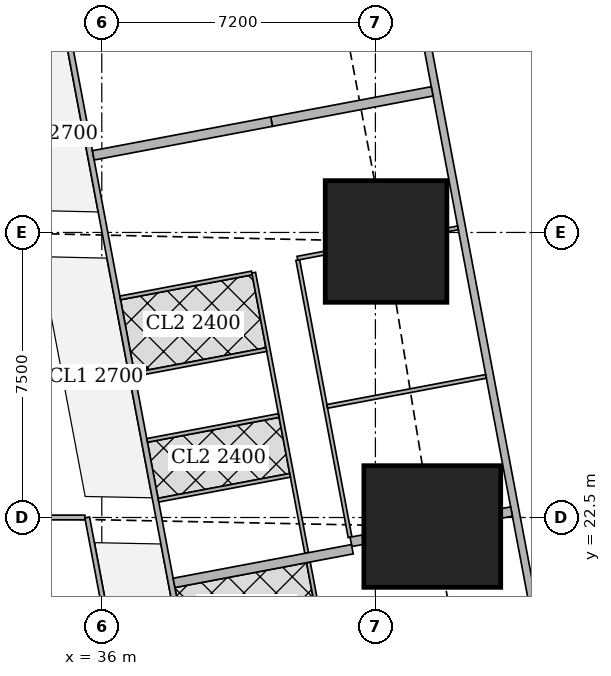
"""IFC4 building model, lengths in metres.
Left out: names, types, materials, properties, quantities, classifications, styles, units other than length and angle.
Written with IfcOpenShell. Run it as: python <this file> out.ifc"""

import sys

from ifc_helpers import new_model, si_unit, direction, frame, frame_2d, origin, origin_2d, place, context, subcontext, project, spatial, rectangle, extrude, element, fill, save


model = new_model("IFC4")
c1 = context("Model", 3, precision=1e-05, world=origin(), true_north=direction((0.0, 1.0)))
c2 = subcontext(c1, "Body", "Model", "MODEL_VIEW")
j1 = project(units=[si_unit("LENGTHUNIT", "METRE"), si_unit("PLANEANGLEUNIT", "RADIAN")], contexts=[c1])
p1 = place(None, origin())
s1 = spatial("IfcSite", under=j1, at=p1, CompositionType="ELEMENT")
p2 = place(p1, origin())
s2 = spatial("IfcBuilding", under=s1, at=p2, CompositionType="ELEMENT")
p3 = place(p2, frame((0.0, 0.0, 20.0)))
s3 = spatial("IfcBuildingStorey", under=s2, at=p3, CompositionType="ELEMENT", Elevation=20.0)
p4 = place(p3, frame((44.697, 22.263, 0.0), z_axis=(0.0, 0.0, 1.0), x_axis=(1.0, 0.0, 0.0)))
e1 = element("IfcColumn", 1, at=p4, inside=s3, PredefinedType="COLUMN", context=c2, shape_type="SweptSolid", body=[
    extrude(rectangle(XDim=3.6, YDim=3.2, at=origin_2d()), origin(), (0.0, 0.0, 1.0), 3.75),
])
p5 = place(p3, frame((43.48, 29.763, 0.0), z_axis=(0.0, 0.0, 1.0), x_axis=(1.0, 0.0, 0.0)))
e2 = element("IfcColumn", 2, at=p5, inside=s3, PredefinedType="COLUMN", context=c2, shape_type="SweptSolid", body=[
    extrude(rectangle(XDim=3.2, YDim=3.2, at=origin_2d()), origin(), (0.0, 0.0, 1.0), 3.75),
])
p6 = place(p3, frame((50.653, 2.703, 0.0), z_axis=(0.0, 0.0, 1.0), x_axis=(-0.185612026696, 0.982623109613, 0.0)))
e3 = element("IfcWall", 3, at=p6, inside=s3, PredefinedType="SOLIDWALL", context=c2, shape_type="SweptSolid", body=[
    extrude(rectangle(XDim=41.393, YDim=0.2, at=frame_2d((20.697, 0.0))), origin(), (0.0, 0.0, 1.0), 3.5),
])
p7 = place(p6, frame((1.633, 0.0, 0.9)))
e4 = element("IfcOpeningElement", 4, at=p7, cuts=e3, PredefinedType="OPENING", context=c2, shape_type="SweptSolid", body=[
    extrude(rectangle(XDim=1.8, YDim=1.5, at=frame_2d((0.9, 0.75))), frame((0.0, 0.11, 0.0), z_axis=(0.0, -1.0, 0.0), x_axis=(1.0, 0.0, 0.0)), (0.0, 0.0, 1.0), 0.22),
])
p8 = place(p6, frame((6.032, 0.0, 0.9)))
e5 = element("IfcOpeningElement", 5, at=p8, cuts=e3, PredefinedType="OPENING", context=c2, shape_type="SweptSolid", body=[
    extrude(rectangle(XDim=1.8, YDim=1.5, at=frame_2d((0.9, 0.75))), frame((0.0, 0.11, 0.0), z_axis=(0.0, -1.0, 0.0), x_axis=(1.0, 0.0, 0.0)), (0.0, 0.0, 1.0), 0.22),
])
p9 = place(p6, frame((9.848, 0.0, 0.9)))
e6 = element("IfcOpeningElement", 6, at=p9, cuts=e3, PredefinedType="OPENING", context=c2, shape_type="SweptSolid", body=[
    extrude(rectangle(XDim=1.8, YDim=1.5, at=frame_2d((0.9, 0.75))), frame((0.0, 0.11, 0.0), z_axis=(0.0, -1.0, 0.0), x_axis=(1.0, 0.0, 0.0)), (0.0, 0.0, 1.0), 0.22),
])
p10 = place(p6, frame((17.481, 0.0, 0.9)))
e7 = element("IfcOpeningElement", 7, at=p10, cuts=e3, PredefinedType="OPENING", context=c2, shape_type="SweptSolid", body=[
    extrude(rectangle(XDim=1.8, YDim=1.5, at=frame_2d((0.9, 0.75))), frame((0.0, 0.11, 0.0), z_axis=(0.0, -1.0, 0.0), x_axis=(1.0, 0.0, 0.0)), (0.0, 0.0, 1.0), 0.22),
])
p11 = place(p6, frame((21.297, 0.0, 0.9)))
e8 = element("IfcOpeningElement", 8, at=p11, cuts=e3, PredefinedType="OPENING", context=c2, shape_type="SweptSolid", body=[
    extrude(rectangle(XDim=1.8, YDim=1.5, at=frame_2d((0.9, 0.75))), frame((0.0, 0.11, 0.0), z_axis=(0.0, -1.0, 0.0), x_axis=(1.0, 0.0, 0.0)), (0.0, 0.0, 1.0), 0.22),
])
p12 = place(p6, frame((25.113, 0.0, 0.9)))
e9 = element("IfcOpeningElement", 9, at=p12, cuts=e3, PredefinedType="OPENING", context=c2, shape_type="SweptSolid", body=[
    extrude(rectangle(XDim=1.8, YDim=1.5, at=frame_2d((0.9, 0.75))), frame((0.0, 0.11, 0.0), z_axis=(0.0, -1.0, 0.0), x_axis=(1.0, 0.0, 0.0)), (0.0, 0.0, 1.0), 0.22),
])
p13 = place(p6, frame((28.93, 0.0, 0.9)))
e10 = element("IfcOpeningElement", 10, at=p13, cuts=e3, PredefinedType="OPENING", context=c2, shape_type="SweptSolid", body=[
    extrude(rectangle(XDim=1.8, YDim=1.5, at=frame_2d((0.9, 0.75))), frame((0.0, 0.11, 0.0), z_axis=(0.0, -1.0, 0.0), x_axis=(1.0, 0.0, 0.0)), (0.0, 0.0, 1.0), 0.22),
])
p14 = place(p6, frame((32.746, 0.0, 0.9)))
e11 = element("IfcOpeningElement", 11, at=p14, cuts=e3, PredefinedType="OPENING", context=c2, shape_type="SweptSolid", body=[
    extrude(rectangle(XDim=1.8, YDim=1.5, at=frame_2d((0.9, 0.75))), frame((0.0, 0.11, 0.0), z_axis=(0.0, -1.0, 0.0), x_axis=(1.0, 0.0, 0.0)), (0.0, 0.0, 1.0), 0.22),
])
p15 = place(p6, frame((36.481, 0.0, 0.9)))
e12 = element("IfcOpeningElement", 12, at=p15, cuts=e3, PredefinedType="OPENING", context=c2, shape_type="SweptSolid", body=[
    extrude(rectangle(XDim=1.8, YDim=1.5, at=frame_2d((0.9, 0.75))), frame((0.0, 0.11, 0.0), z_axis=(0.0, -1.0, 0.0), x_axis=(1.0, 0.0, 0.0)), (0.0, 0.0, 1.0), 0.22),
])
p16 = place(p3, frame((33.755, 42.325, 0.0), z_axis=(0.0, 0.0, 1.0), x_axis=(0.185611461091, -0.982623216453, 0.0)))
e13 = element("IfcWall", 13, at=p16, inside=s3, PredefinedType="SOLIDWALL", context=c2, shape_type="SweptSolid", body=[
    extrude(rectangle(XDim=40.241, YDim=0.15, at=frame_2d((20.121, 0.0))), origin(), (0.0, 0.0, 1.0), 2.5),
])
p17 = place(p16, frame((7.325, 0.0, 0.0)))
e14 = element("IfcOpeningElement", 14, at=p17, cuts=e13, PredefinedType="OPENING", context=c2, shape_type="SweptSolid", body=[
    extrude(rectangle(XDim=1.0, YDim=2.1, at=frame_2d((0.5, 1.05))), frame((0.0, 0.085, 0.0), z_axis=(0.0, -1.0, 0.0), x_axis=(1.0, 0.0, 0.0)), (0.0, 0.0, 1.0), 0.17),
])
p18 = place(p16, frame((11.902, 0.0, 0.0)))
e15 = element("IfcOpeningElement", 15, at=p18, cuts=e13, PredefinedType="OPENING", context=c2, shape_type="SweptSolid", body=[
    extrude(rectangle(XDim=1.0, YDim=2.1, at=frame_2d((0.5, 1.05))), frame((0.0, 0.085, 0.0), z_axis=(0.0, -1.0, 0.0), x_axis=(1.0, 0.0, 0.0)), (0.0, 0.0, 1.0), 0.17),
])
p19 = place(p16, frame((25.718, 0.0, 0.0)))
e16 = element("IfcOpeningElement", 16, at=p19, cuts=e13, PredefinedType="OPENING", context=c2, shape_type="SweptSolid", body=[
    extrude(rectangle(XDim=1.0, YDim=2.1, at=frame_2d((0.5, 1.05))), frame((0.0, 0.085, 0.0), z_axis=(0.0, -1.0, 0.0), x_axis=(1.0, 0.0, 0.0)), (0.0, 0.0, 1.0), 0.17),
])
p20 = place(p16, frame((31.788, 0.0, 0.0)))
e17 = element("IfcOpeningElement", 17, at=p20, cuts=e13, PredefinedType="OPENING", context=c2, shape_type="SweptSolid", body=[
    extrude(rectangle(XDim=1.0, YDim=2.1, at=frame_2d((0.5, 1.05))), frame((0.0, 0.085, 0.0), z_axis=(0.0, -1.0, 0.0), x_axis=(1.0, 0.0, 0.0)), (0.0, 0.0, 1.0), 0.17),
])
p21 = place(p3, frame((41.157, 29.273, 0.0), z_axis=(0.0, 0.0, 1.0), x_axis=(0.18542464283, -0.982658486877, 0.0)))
e18 = element("IfcWall", 18, at=p21, inside=s3, PredefinedType="PARTITIONING", context=c2, shape_type="SweptSolid", body=[
    extrude(rectangle(XDim=7.421, YDim=0.1, at=frame_2d((3.71, 0.0))), origin(), (0.0, 0.0, 1.0), 2.5),
])
p22 = place(p21, frame((1.4, 0.0, 0.0)))
e19 = element("IfcOpeningElement", 19, at=p22, cuts=e18, PredefinedType="OPENING", context=c2, shape_type="SweptSolid", body=[
    extrude(rectangle(XDim=0.9, YDim=2.1, at=frame_2d((0.45, 1.05))), frame((0.0, 0.06, 0.0), z_axis=(0.0, -1.0, 0.0), x_axis=(1.0, 0.0, 0.0)), (0.0, 0.0, 1.0), 0.12),
])
p23 = place(p21, frame((4.126, 0.0, 0.0)))
e20 = element("IfcOpeningElement", 20, at=p23, cuts=e18, PredefinedType="OPENING", context=c2, shape_type="SweptSolid", body=[
    extrude(rectangle(XDim=0.9, YDim=2.1, at=frame_2d((0.45, 1.05))), frame((0.0, 0.06, 0.0), z_axis=(0.0, -1.0, 0.0), x_axis=(1.0, 0.0, 0.0)), (0.0, 0.0, 1.0), 0.12),
])
p24 = place(p3, frame((39.997, 28.942, 0.0), z_axis=(0.0, 0.0, 1.0), x_axis=(0.185686318797, -0.982609073341, 0.0)))
e21 = element("IfcWall", 21, at=p24, inside=s3, PredefinedType="PARTITIONING", context=c2, shape_type="SweptSolid", body=[
    extrude(rectangle(XDim=7.508, YDim=0.1, at=frame_2d((3.754, 0.0))), origin(), (0.0, 0.0, 1.0), 2.5),
])
p25 = place(p24, frame((0.576, 0.0, 0.0)))
e22 = element("IfcOpeningElement", 22, at=p25, cuts=e21, PredefinedType="OPENING", context=c2, shape_type="SweptSolid", body=[
    extrude(rectangle(XDim=0.9, YDim=2.1, at=frame_2d((0.45, 1.05))), frame((0.0, 0.06, 0.0), z_axis=(0.0, -1.0, 0.0), x_axis=(1.0, 0.0, 0.0)), (0.0, 0.0, 1.0), 0.12),
])
p26 = place(p24, frame((4.166, 0.0, 0.0)))
e23 = element("IfcOpeningElement", 23, at=p26, cuts=e21, PredefinedType="OPENING", context=c2, shape_type="SweptSolid", body=[
    extrude(rectangle(XDim=0.9, YDim=2.1, at=frame_2d((0.45, 1.05))), frame((0.0, 0.06, 0.0), z_axis=(0.0, -1.0, 0.0), x_axis=(1.0, 0.0, 0.0)), (0.0, 0.0, 1.0), 0.12),
])
p27 = place(p24, frame((2.483, 0.0, 0.0)))
e24 = element("IfcOpeningElement", 24, at=p27, cuts=e21, PredefinedType="OPENING", context=c2, shape_type="SweptSolid", body=[
    extrude(rectangle(XDim=0.9, YDim=2.1, at=frame_2d((0.45, 1.05))), frame((0.0, 0.06, 0.0), z_axis=(0.0, -1.0, 0.0), x_axis=(1.0, 0.0, 0.0)), (0.0, 0.0, 1.0), 0.12),
])
p28 = place(p24, frame((6.074, 0.0, 0.0)))
e25 = element("IfcOpeningElement", 25, at=p28, cuts=e21, PredefinedType="OPENING", context=c2, shape_type="SweptSolid", body=[
    extrude(rectangle(XDim=0.9, YDim=2.1, at=frame_2d((0.45, 1.05))), frame((0.0, 0.06, 0.0), z_axis=(0.0, -1.0, 0.0), x_axis=(1.0, 0.0, 0.0)), (0.0, 0.0, 1.0), 0.12),
])
p29 = place(p3, frame((45.372, 30.121, 0.0), z_axis=(0.0, 0.0, 1.0), x_axis=(-0.982024635814, -0.188752787143, 0.0)))
e26 = element("IfcWall", 26, at=p29, inside=s3, PredefinedType="PARTITIONING", context=c2, shape_type="SweptSolid", body=[
    extrude(rectangle(XDim=0.287, YDim=0.1, at=frame_2d((0.144, 0.0))), origin(), (0.0, 0.0, 1.0), 3.5),
])
p30 = place(p3, frame((41.87, 29.459, 0.0), z_axis=(0.0, 0.0, 1.0), x_axis=(-0.982532562822, -0.186090738603, 0.0)))
e27 = element("IfcWall", 27, at=p30, inside=s3, PredefinedType="PARTITIONING", context=c2, shape_type="SweptSolid", body=[
    extrude(rectangle(XDim=0.736, YDim=0.1, at=frame_2d((0.368, 0.0))), origin(), (0.0, 0.0, 1.0), 2.5),
])
p31 = place(p3, frame((46.11, 26.213, 0.0), z_axis=(0.0, 0.0, 1.0), x_axis=(-0.982623519589, -0.185609856287, 0.0)))
e28 = element("IfcWall", 28, at=p31, inside=s3, PredefinedType="PARTITIONING", context=c2, shape_type="SweptSolid", body=[
    extrude(rectangle(XDim=4.25, YDim=0.1, at=frame_2d((2.125, 0.0))), origin(), (0.0, 0.0, 1.0), 2.05),
])
for number, where, z_axis, x_axis in (
    (29, (39.948, 28.933, 0.0), (0.0, 0.0, 1.0), (-0.983, -0.186, 0.0)),
    (30, (40.656, 25.183, 0.0), (0.0, 0.0, 1.0), (-0.983, -0.186, 0.0)),
):
    element("IfcWall", number, at=place(p3, frame(where, z_axis=z_axis, x_axis=x_axis)), inside=s3, PredefinedType="PARTITIONING", context=c2, shape_type="SweptSolid", body=[
        extrude(rectangle(XDim=3.524, YDim=0.1, at=frame_2d((1.762, 0.0))), origin(), (0.0, 0.0, 1.0), 3.5),
    ])
p32 = place(p3, frame((40.329, 26.918, 0.0), z_axis=(0.0, 0.0, 1.0), x_axis=(-0.982638553676, -0.185530247748, 0.0)))
e31 = element("IfcWall", 31, at=p32, inside=s3, PredefinedType="PARTITIONING", context=c2, shape_type="SweptSolid", body=[
    extrude(rectangle(XDim=3.525, YDim=0.1, at=frame_2d((1.763, 0.0))), origin(), (0.0, 0.0, 1.0), 3.5),
])
p33 = place(p3, frame((40.954, 23.61, 0.0), z_axis=(0.0, 0.0, 1.0), x_axis=(-0.982638553676, -0.185530247748, 0.0)))
e32 = element("IfcWall", 32, at=p33, inside=s3, PredefinedType="PARTITIONING", context=c2, shape_type="SweptSolid", body=[
    extrude(rectangle(XDim=3.525, YDim=0.1, at=frame_2d((1.763, 0.0))), origin(), (0.0, 0.0, 1.0), 2.5),
])
p34 = place(p3, frame((44.693, 33.713, 0.0), z_axis=(0.0, 0.0, 1.0), x_axis=(-0.982633535512, -0.185556823879, 0.0)))
e33 = element("IfcWall", 33, at=p34, inside=s3, PredefinedType="SOLIDWALL", context=c2, shape_type="SweptSolid", body=[
    extrude(rectangle(XDim=4.3, YDim=0.25, at=frame_2d((2.15, 0.0))), origin(), (0.0, 0.0, 1.0), 2.05),
])
p35 = place(p3, frame((40.468, 32.915, 0.0), z_axis=(0.0, 0.0, 1.0), x_axis=(-0.982635807605, -0.185544791394, 0.0)))
e34 = element("IfcWall", 34, at=p35, inside=s3, PredefinedType="SOLIDWALL", context=c2, shape_type="SweptSolid", body=[
    extrude(rectangle(XDim=4.775, YDim=0.25, at=frame_2d((2.388, 0.0))), origin(), (0.0, 0.0, 1.0), 3.5),
])
p36 = place(p3, frame((41.437, 21.319, 0.0), z_axis=(0.0, 0.0, 1.0), x_axis=(0.185783379659, -0.98259072652, 0.0)))
e35 = element("IfcWall", 35, at=p36, inside=s3, PredefinedType="PARTITIONING", context=c2, shape_type="SweptSolid", body=[
    extrude(rectangle(XDim=1.765, YDim=0.1, at=frame_2d((0.882, 0.0))), origin(), (0.0, 0.0, 1.0), 3.5),
])
p37 = place(p36, frame((0.374, 0.0, 0.0)))
e36 = element("IfcOpeningElement", 36, at=p37, cuts=e35, PredefinedType="OPENING", context=c2, shape_type="SweptSolid", body=[
    extrude(rectangle(XDim=0.9, YDim=2.1, at=frame_2d((0.45, 1.05))), frame((0.0, 0.06, 0.0), z_axis=(0.0, -1.0, 0.0), x_axis=(1.0, 0.0, 0.0)), (0.0, 0.0, 1.0), 0.12),
])
p38 = place(p3, frame((46.782, 22.657, 0.0), z_axis=(0.0, 0.0, 1.0), x_axis=(-0.982104607121, -0.188336243648, 0.0)))
e37 = element("IfcWall", 37, at=p38, inside=s3, PredefinedType="SOLIDWALL", context=c2, shape_type="SweptSolid", body=[
    extrude(rectangle(XDim=0.266, YDim=0.25, at=frame_2d((0.133, 0.0))), origin(), (0.0, 0.0, 1.0), 3.5),
])
p39 = place(p3, frame((42.873, 21.918, 0.0), z_axis=(0.0, 0.0, 1.0), x_axis=(-0.982431406936, -0.186624035603, 0.0)))
e38 = element("IfcWall", 38, at=p39, inside=s3, PredefinedType="SOLIDWALL", context=c2, shape_type="SweptSolid", body=[
    extrude(rectangle(XDim=0.322, YDim=0.25, at=frame_2d((0.161, 0.0))), origin(), (0.0, 0.0, 1.0), 2.5),
])
p40 = place(p3, frame((42.593, 21.665, 0.0), z_axis=(0.0, 0.0, 1.0), x_axis=(-0.982635807605, -0.185544791394, 0.0)))
e39 = element("IfcWall", 39, at=p40, inside=s3, PredefinedType="SOLIDWALL", context=c2, shape_type="SweptSolid", body=[
    extrude(rectangle(XDim=4.775, YDim=0.25, at=frame_2d((2.388, 0.0))), origin(), (0.0, 0.0, 1.0), 2.5),
])
p41 = place(p3, frame((36.861, 15.913, 0.0), z_axis=(0.0, 0.0, 1.0), x_axis=(-0.185598960122, 0.982625577726, 0.0)))
e40 = element("IfcWall", 40, at=p41, inside=s3, PredefinedType="PARTITIONING", context=c2, shape_type="SweptSolid", body=[
    extrude(rectangle(XDim=6.703, YDim=0.125, at=frame_2d((3.352, 0.0))), origin(), (0.0, 0.0, 1.0), 2.5),
])
p42 = place(p41, frame((0.25, 0.0, 0.0)))
e41 = element("IfcOpeningElement", 41, at=p42, cuts=e40, PredefinedType="OPENING", context=c2, shape_type="SweptSolid", body=[
    extrude(rectangle(XDim=1.0, YDim=2.1, at=frame_2d((0.5, 1.05))), frame((0.0, 0.073, 0.0), z_axis=(0.0, -1.0, 0.0), x_axis=(1.0, 0.0, 0.0)), (0.0, 0.0, 1.0), 0.145),
])
p43 = place(p41, frame((3.71, 0.0, 0.0)))
e42 = element("IfcOpeningElement", 42, at=p43, cuts=e40, PredefinedType="OPENING", context=c2, shape_type="SweptSolid", body=[
    extrude(rectangle(XDim=1.0, YDim=2.1, at=frame_2d((0.5, 1.05))), frame((0.0, 0.073, 0.0), z_axis=(0.0, -1.0, 0.0), x_axis=(1.0, 0.0, 0.0)), (0.0, 0.0, 1.0), 0.145),
])
p44 = place(p3, frame((33.901, 22.5, 0.0), z_axis=(0.0, 0.0, 1.0), x_axis=(1.0, 0.0, 0.0)))
e43 = element("IfcWall", 43, at=p44, inside=s3, PredefinedType="PARTITIONING", context=c2, shape_type="SweptSolid", body=[
    extrude(rectangle(XDim=1.655, YDim=0.125, at=frame_2d((0.828, 0.0))), origin(), (0.0, 0.0, 1.0), 2.5),
])
p45 = place(p10, origin())
e44 = element("IfcWindow", 44, at=p45, inside=s3, PartitioningType="SINGLE_PANEL", PredefinedType="WINDOW", context=c2, shape_type="SweptSolid", body=[
    extrude(rectangle(XDim=1.8, YDim=1.5, at=frame_2d((0.9, 0.75))), frame((0.0, 0.03, 0.0), z_axis=(0.0, -1.0, 0.0), x_axis=(1.0, 0.0, 0.0)), (0.0, 0.0, 1.0), 0.06),
])
fill(e7, e44)
p46 = place(p11, origin())
e45 = element("IfcWindow", 45, at=p46, inside=s3, PartitioningType="SINGLE_PANEL", PredefinedType="WINDOW", context=c2, shape_type="SweptSolid", body=[
    extrude(rectangle(XDim=1.8, YDim=1.5, at=frame_2d((0.9, 0.75))), frame((0.0, 0.03, 0.0), z_axis=(0.0, -1.0, 0.0), x_axis=(1.0, 0.0, 0.0)), (0.0, 0.0, 1.0), 0.06),
])
fill(e8, e45)
p47 = place(p12, origin())
e46 = element("IfcWindow", 46, at=p47, inside=s3, PartitioningType="SINGLE_PANEL", PredefinedType="WINDOW", context=c2, shape_type="SweptSolid", body=[
    extrude(rectangle(XDim=1.8, YDim=1.5, at=frame_2d((0.9, 0.75))), frame((0.0, 0.03, 0.0), z_axis=(0.0, -1.0, 0.0), x_axis=(1.0, 0.0, 0.0)), (0.0, 0.0, 1.0), 0.06),
])
fill(e9, e46)
p48 = place(p13, origin())
e47 = element("IfcWindow", 47, at=p48, inside=s3, PartitioningType="SINGLE_PANEL", PredefinedType="WINDOW", context=c2, shape_type="SweptSolid", body=[
    extrude(rectangle(XDim=1.8, YDim=1.5, at=frame_2d((0.9, 0.75))), frame((0.0, 0.03, 0.0), z_axis=(0.0, -1.0, 0.0), x_axis=(1.0, 0.0, 0.0)), (0.0, 0.0, 1.0), 0.06),
])
fill(e10, e47)
p49 = place(p17, origin())
e48 = element("IfcDoor", 48, at=p49, inside=s3, OperationType="SINGLE_SWING_RIGHT", PredefinedType="DOOR", context=c2, shape_type="SweptSolid", body=[
    extrude(rectangle(XDim=1.0, YDim=2.1, at=frame_2d((0.5, 1.05))), frame((0.0, 0.025, 0.0), z_axis=(0.0, -1.0, 0.0), x_axis=(1.0, 0.0, 0.0)), (0.0, 0.0, 1.0), 0.05),
])
fill(e14, e48)
p50 = place(p22, origin())
e49 = element("IfcDoor", 49, at=p50, inside=s3, OperationType="SINGLE_SWING_LEFT", PredefinedType="DOOR", context=c2, shape_type="SweptSolid", body=[
    extrude(rectangle(XDim=0.9, YDim=2.1, at=frame_2d((0.45, 1.05))), frame((0.0, 0.025, 0.0), z_axis=(0.0, -1.0, 0.0), x_axis=(1.0, 0.0, 0.0)), (0.0, 0.0, 1.0), 0.05),
])
fill(e19, e49)
p51 = place(p23, origin())
e50 = element("IfcDoor", 50, at=p51, inside=s3, OperationType="SINGLE_SWING_LEFT", PredefinedType="DOOR", context=c2, shape_type="SweptSolid", body=[
    extrude(rectangle(XDim=0.9, YDim=2.1, at=frame_2d((0.45, 1.05))), frame((0.0, 0.025, 0.0), z_axis=(0.0, -1.0, 0.0), x_axis=(1.0, 0.0, 0.0)), (0.0, 0.0, 1.0), 0.05),
])
fill(e20, e50)
p52 = place(p25, origin())
e51 = element("IfcDoor", 51, at=p52, inside=s3, OperationType="SINGLE_SWING_RIGHT", PredefinedType="DOOR", context=c2, shape_type="SweptSolid", body=[
    extrude(rectangle(XDim=0.9, YDim=2.1, at=frame_2d((0.45, 1.05))), frame((0.0, 0.025, 0.0), z_axis=(0.0, -1.0, 0.0), x_axis=(1.0, 0.0, 0.0)), (0.0, 0.0, 1.0), 0.05),
])
fill(e22, e51)
p53 = place(p26, origin())
e52 = element("IfcDoor", 52, at=p53, inside=s3, OperationType="SINGLE_SWING_LEFT", PredefinedType="DOOR", context=c2, shape_type="SweptSolid", body=[
    extrude(rectangle(XDim=0.9, YDim=2.1, at=frame_2d((0.45, 1.05))), frame((0.0, 0.025, 0.0), z_axis=(0.0, -1.0, 0.0), x_axis=(1.0, 0.0, 0.0)), (0.0, 0.0, 1.0), 0.05),
])
fill(e23, e52)
p54 = place(p27, origin())
e53 = element("IfcDoor", 53, at=p54, inside=s3, OperationType="SINGLE_SWING_LEFT", PredefinedType="DOOR", context=c2, shape_type="SweptSolid", body=[
    extrude(rectangle(XDim=0.9, YDim=2.1, at=frame_2d((0.45, 1.05))), frame((0.0, 0.025, 0.0), z_axis=(0.0, -1.0, 0.0), x_axis=(1.0, 0.0, 0.0)), (0.0, 0.0, 1.0), 0.05),
])
fill(e24, e53)
p55 = place(p28, origin())
e54 = element("IfcDoor", 54, at=p55, inside=s3, OperationType="SINGLE_SWING_LEFT", PredefinedType="DOOR", context=c2, shape_type="SweptSolid", body=[
    extrude(rectangle(XDim=0.9, YDim=2.1, at=frame_2d((0.45, 1.05))), frame((0.0, 0.025, 0.0), z_axis=(0.0, -1.0, 0.0), x_axis=(1.0, 0.0, 0.0)), (0.0, 0.0, 1.0), 0.05),
])
fill(e25, e54)
p56 = place(p18, origin())
e55 = element("IfcDoor", 55, at=p56, inside=s3, OperationType="SINGLE_SWING_LEFT", PredefinedType="DOOR", context=c2, shape_type="SweptSolid", body=[
    extrude(rectangle(XDim=1.0, YDim=2.1, at=frame_2d((0.5, 1.05))), frame((0.0, 0.025, 0.0), z_axis=(0.0, -1.0, 0.0), x_axis=(1.0, 0.0, 0.0)), (0.0, 0.0, 1.0), 0.05),
])
fill(e15, e55)
p57 = place(p37, origin())
e56 = element("IfcDoor", 56, at=p57, inside=s3, OperationType="SINGLE_SWING_RIGHT", PredefinedType="DOOR", context=c2, shape_type="SweptSolid", body=[
    extrude(rectangle(XDim=0.9, YDim=2.1, at=frame_2d((0.45, 1.05))), frame((0.0, 0.025, 0.0), z_axis=(0.0, -1.0, 0.0), x_axis=(1.0, 0.0, 0.0)), (0.0, 0.0, 1.0), 0.05),
])
fill(e36, e56)
p58 = place(p43, origin())
e57 = element("IfcDoor", 57, at=p58, inside=s3, OperationType="SINGLE_SWING_LEFT", PredefinedType="DOOR", context=c2, shape_type="SweptSolid", body=[
    extrude(rectangle(XDim=1.0, YDim=2.1, at=frame_2d((0.5, 1.05))), frame((0.0, 0.025, 0.0), z_axis=(0.0, -1.0, 0.0), x_axis=(1.0, 0.0, 0.0)), (0.0, 0.0, 1.0), 0.05),
])
fill(e42, e57)
save(model, sys.argv[1])
